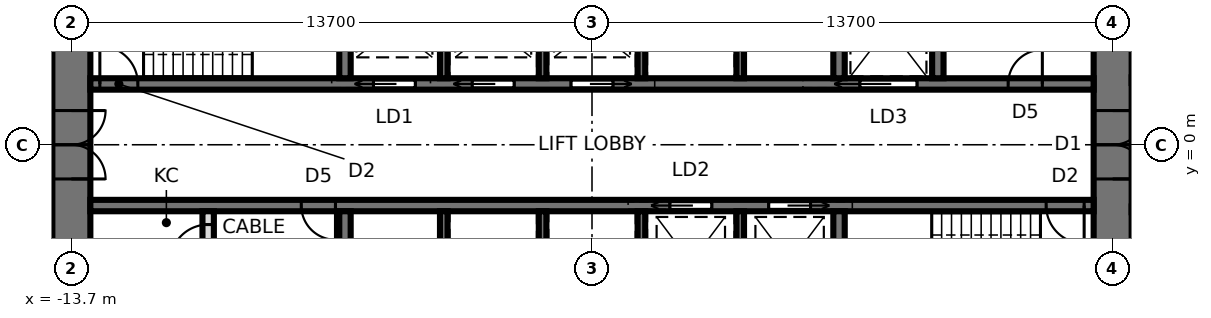
"""IFC4 building model, lengths in metres.
Left out: names, types, materials, properties, quantities, classifications, styles, units other than length and angle.
Written with IfcOpenShell. Run it as: python <this file> out.ifc"""

import sys

from ifc_helpers import new_model, si_unit, direction, frame, frame_2d, origin, place, context, subcontext, project, spatial, rectangle, extrude, element, fill, save


model = new_model("IFC4")
c1 = context("Model", 3, precision=1e-05, world=origin(), true_north=direction((0.0, 1.0)))
c2 = subcontext(c1, "Body", "Model", "MODEL_VIEW")
j1 = project(units=[si_unit("LENGTHUNIT", "METRE"), si_unit("PLANEANGLEUNIT", "RADIAN")], contexts=[c1])
p1 = place(None, origin())
s1 = spatial("IfcSite", under=j1, at=p1, CompositionType="ELEMENT")
p2 = place(p1, origin())
s2 = spatial("IfcBuilding", under=s1, at=p2, CompositionType="ELEMENT")
p3 = place(p2, frame((0.0, 0.0, 23.8)))
s3 = spatial("IfcBuildingStorey", under=s2, at=p3, CompositionType="ELEMENT", Elevation=23.8)
p4 = place(p3, frame((13.7, -9.5, 0.0), z_axis=(0.0, 0.0, 1.0), x_axis=(0.0, 1.0, 0.0)))
e1 = element("IfcWall", 1, at=p4, inside=s3, PredefinedType="SHEAR", context=c2, shape_type="SweptSolid", body=[
    extrude(rectangle(XDim=19.0, YDim=1.0, at=frame_2d((9.5, 0.0))), origin(), (0.0, 0.0, 1.0), 4.2),
])
p5 = place(p4, frame((8.6, 0.0, 0.0)))
e2 = element("IfcOpeningElement", 2, at=p5, cuts=e1, PredefinedType="OPENING", context=c2, shape_type="SweptSolid", body=[
    extrude(rectangle(XDim=1.8, YDim=2.4, at=frame_2d((0.9, 1.2))), frame((0.0, 0.51, 0.0), z_axis=(0.0, -1.0, 0.0), x_axis=(1.0, 0.0, 0.0)), (0.0, 0.0, 1.0), 1.02),
])
p6 = place(p3, frame((-13.7, 9.5, 0.0), z_axis=(0.0, 0.0, 1.0), x_axis=(0.0, -1.0, 0.0)))
e3 = element("IfcWall", 3, at=p6, inside=s3, PredefinedType="SHEAR", context=c2, shape_type="SweptSolid", body=[
    extrude(rectangle(XDim=19.0, YDim=1.0, at=frame_2d((9.5, 0.0))), origin(), (0.0, 0.0, 1.0), 4.2),
])
p7 = place(p6, frame((8.6, 0.0, 0.0)))
e4 = element("IfcOpeningElement", 4, at=p7, cuts=e3, PredefinedType="OPENING", context=c2, shape_type="SweptSolid", body=[
    extrude(rectangle(XDim=1.8, YDim=2.4, at=frame_2d((0.9, 1.2))), frame((0.0, 0.51, 0.0), z_axis=(0.0, -1.0, 0.0), x_axis=(1.0, 0.0, 0.0)), (0.0, 0.0, 1.0), 1.02),
])
p8 = place(p3, frame((-13.2, 1.6, 0.0), z_axis=(0.0, 0.0, 1.0), x_axis=(1.0, 0.0, 0.0)))
e5 = element("IfcWall", 5, at=p8, inside=s3, PredefinedType="SHEAR", context=c2, shape_type="SweptSolid", body=[
    extrude(rectangle(XDim=26.4, YDim=0.3, at=frame_2d((13.2, 0.0))), origin(), (0.0, 0.0, 1.0), 4.2),
])
p9 = place(p8, frame((0.25, 0.0, 0.0)))
e6 = element("IfcOpeningElement", 6, at=p9, cuts=e5, PredefinedType="OPENING", context=c2, shape_type="SweptSolid", body=[
    extrude(rectangle(XDim=1.0, YDim=2.1, at=frame_2d((0.5, 1.05))), frame((0.0, 0.16, 0.0), z_axis=(0.0, -1.0, 0.0), x_axis=(1.0, 0.0, 0.0)), (0.0, 0.0, 1.0), 0.32),
])
p10 = place(p8, frame((20.25, 0.0, 0.0)))
e7 = element("IfcOpeningElement", 7, at=p10, cuts=e5, PredefinedType="OPENING", context=c2, shape_type="SweptSolid", body=[
    extrude(rectangle(XDim=1.5, YDim=2.4, at=frame_2d((0.75, 1.2))), frame((0.0, 0.16, 0.0), z_axis=(0.0, -1.0, 0.0), x_axis=(1.0, 0.0, 0.0)), (0.0, 0.0, 1.0), 0.32),
])
p11 = place(p8, frame((7.45, 0.0, 0.0)))
e8 = element("IfcOpeningElement", 8, at=p11, cuts=e5, PredefinedType="OPENING", context=c2, shape_type="SweptSolid", body=[
    extrude(rectangle(XDim=1.1, YDim=2.3, at=frame_2d((0.55, 1.15))), frame((0.0, 0.16, 0.0), z_axis=(0.0, -1.0, 0.0), x_axis=(1.0, 0.0, 0.0)), (0.0, 0.0, 1.0), 0.32),
])
p12 = place(p8, frame((10.05, 0.0, 0.0)))
e9 = element("IfcOpeningElement", 9, at=p12, cuts=e5, PredefinedType="OPENING", context=c2, shape_type="SweptSolid", body=[
    extrude(rectangle(XDim=1.1, YDim=2.3, at=frame_2d((0.55, 1.15))), frame((0.0, 0.16, 0.0), z_axis=(0.0, -1.0, 0.0), x_axis=(1.0, 0.0, 0.0)), (0.0, 0.0, 1.0), 0.32),
])
p13 = place(p8, frame((12.65, 0.0, 0.0)))
e10 = element("IfcOpeningElement", 10, at=p13, cuts=e5, PredefinedType="OPENING", context=c2, shape_type="SweptSolid", body=[
    extrude(rectangle(XDim=1.1, YDim=2.3, at=frame_2d((0.55, 1.15))), frame((0.0, 0.16, 0.0), z_axis=(0.0, -1.0, 0.0), x_axis=(1.0, 0.0, 0.0)), (0.0, 0.0, 1.0), 0.32),
])
p14 = place(p8, frame((24.15, 0.0, 0.0)))
e11 = element("IfcOpeningElement", 11, at=p14, cuts=e5, PredefinedType="OPENING", context=c2, shape_type="SweptSolid", body=[
    extrude(rectangle(XDim=0.9, YDim=2.1, at=frame_2d((0.45, 1.05))), frame((0.0, 0.16, 0.0), z_axis=(0.0, -1.0, 0.0), x_axis=(1.0, 0.0, 0.0)), (0.0, 0.0, 1.0), 0.32),
])
p15 = place(p3, frame((-13.2, -1.6, 0.0), z_axis=(0.0, 0.0, 1.0), x_axis=(1.0, 0.0, 0.0)))
e12 = element("IfcWall", 12, at=p15, inside=s3, PredefinedType="SHEAR", context=c2, shape_type="SweptSolid", body=[
    extrude(rectangle(XDim=26.4, YDim=0.3, at=frame_2d((13.2, 0.0))), origin(), (0.0, 0.0, 1.0), 4.2),
])
p16 = place(p15, frame((25.15, 0.0, 0.0)))
e13 = element("IfcOpeningElement", 13, at=p16, cuts=e12, PredefinedType="OPENING", context=c2, shape_type="SweptSolid", body=[
    extrude(rectangle(XDim=1.0, YDim=2.1, at=frame_2d((0.5, 1.05))), frame((0.0, 0.16, 0.0), z_axis=(0.0, -1.0, 0.0), x_axis=(1.0, 0.0, 0.0)), (0.0, 0.0, 1.0), 0.32),
])
p17 = place(p15, frame((15.25, 0.0, 0.0)))
e14 = element("IfcOpeningElement", 14, at=p17, cuts=e12, PredefinedType="OPENING", context=c2, shape_type="SweptSolid", body=[
    extrude(rectangle(XDim=1.1, YDim=2.3, at=frame_2d((0.55, 1.15))), frame((0.0, 0.16, 0.0), z_axis=(0.0, -1.0, 0.0), x_axis=(1.0, 0.0, 0.0)), (0.0, 0.0, 1.0), 0.32),
])
p18 = place(p15, frame((17.85, 0.0, 0.0)))
e15 = element("IfcOpeningElement", 15, at=p18, cuts=e12, PredefinedType="OPENING", context=c2, shape_type="SweptSolid", body=[
    extrude(rectangle(XDim=1.1, YDim=2.3, at=frame_2d((0.55, 1.15))), frame((0.0, 0.16, 0.0), z_axis=(0.0, -1.0, 0.0), x_axis=(1.0, 0.0, 0.0)), (0.0, 0.0, 1.0), 0.32),
])
p19 = place(p15, frame((5.55, 0.0, 0.0)))
e16 = element("IfcOpeningElement", 16, at=p19, cuts=e12, PredefinedType="OPENING", context=c2, shape_type="SweptSolid", body=[
    extrude(rectangle(XDim=0.9, YDim=2.1, at=frame_2d((0.45, 1.05))), frame((0.0, 0.16, 0.0), z_axis=(0.0, -1.0, 0.0), x_axis=(1.0, 0.0, 0.0)), (0.0, 0.0, 1.0), 0.32),
])
for number, where, z_axis, x_axis in (
    (17, (-6.5, 1.75, 0.0), (0.0, 0.0, 1.0), (0.0, 1.0, 0.0)),
    (18, (6.5, 1.75, 0.0), (0.0, 0.0, 1.0), (0.0, 1.0, 0.0)),
):
    element("IfcWall", number, at=place(p3, frame(where, z_axis=z_axis, x_axis=x_axis)), inside=s3, PredefinedType="SHEAR", context=c2, shape_type="SweptSolid", body=[
        extrude(rectangle(XDim=2.7, YDim=0.3, at=frame_2d((1.35, 0.0))), origin(), (0.0, 0.0, 1.0), 4.2),
    ])
for number, where, z_axis, x_axis in (
    (19, (-3.9, 1.75, 0.0), (0.0, 0.0, 1.0), (0.0, 1.0, 0.0)),
    (20, (-1.3, 1.75, 0.0), (0.0, 0.0, 1.0), (0.0, 1.0, 0.0)),
    (21, (1.3, 1.75, 0.0), (0.0, 0.0, 1.0), (0.0, 1.0, 0.0)),
    (22, (3.9, 1.75, 0.0), (0.0, 0.0, 1.0), (0.0, 1.0, 0.0)),
):
    element("IfcWall", number, at=place(p3, frame(where, z_axis=z_axis, x_axis=x_axis)), inside=s3, PredefinedType="SHEAR", context=c2, shape_type="SweptSolid", body=[
        extrude(rectangle(XDim=2.7, YDim=0.2, at=frame_2d((1.35, 0.0))), origin(), (0.0, 0.0, 1.0), 4.2),
    ])
for number, where, z_axis, x_axis in (
    (23, (-6.5, -1.75, 0.0), (0.0, 0.0, 1.0), (0.0, -1.0, 0.0)),
    (24, (6.5, -1.75, 0.0), (0.0, 0.0, 1.0), (0.0, -1.0, 0.0)),
):
    element("IfcWall", number, at=place(p3, frame(where, z_axis=z_axis, x_axis=x_axis)), inside=s3, PredefinedType="SHEAR", context=c2, shape_type="SweptSolid", body=[
        extrude(rectangle(XDim=2.7, YDim=0.3, at=frame_2d((1.35, 0.0))), origin(), (0.0, 0.0, 1.0), 4.2),
    ])
for number, where, z_axis, x_axis in (
    (25, (-3.9, -1.75, 0.0), (0.0, 0.0, 1.0), (0.0, -1.0, 0.0)),
    (26, (-1.3, -1.75, 0.0), (0.0, 0.0, 1.0), (0.0, -1.0, 0.0)),
    (27, (1.3, -1.75, 0.0), (0.0, 0.0, 1.0), (0.0, -1.0, 0.0)),
    (28, (3.9, -1.75, 0.0), (0.0, 0.0, 1.0), (0.0, -1.0, 0.0)),
):
    element("IfcWall", number, at=place(p3, frame(where, z_axis=z_axis, x_axis=x_axis)), inside=s3, PredefinedType="SHEAR", context=c2, shape_type="SweptSolid", body=[
        extrude(rectangle(XDim=2.7, YDim=0.2, at=frame_2d((1.35, 0.0))), origin(), (0.0, 0.0, 1.0), 4.2),
    ])
p20 = place(p3, frame((9.1, 1.75, 0.0), z_axis=(0.0, 0.0, 1.0), x_axis=(0.0, 1.0, 0.0)))
e29 = element("IfcWall", 29, at=p20, inside=s3, PredefinedType="SHEAR", context=c2, shape_type="SweptSolid", body=[
    extrude(rectangle(XDim=2.7, YDim=0.3, at=frame_2d((1.35, 0.0))), origin(), (0.0, 0.0, 1.0), 4.2),
])
p21 = place(p3, frame((-10.1, -3.25, 0.0), z_axis=(0.0, 0.0, 1.0), x_axis=(0.0, 1.0, 0.0)))
e30 = element("IfcWall", 30, at=p21, inside=s3, PredefinedType="PARTITIONING", context=c2, shape_type="SweptSolid", body=[
    extrude(rectangle(XDim=1.5, YDim=0.3, at=frame_2d((0.75, 0.0))), origin(), (0.0, 0.0, 1.0), 4.04),
])
p22 = place(p21, frame((0.15, 0.0, 0.0)))
e31 = element("IfcOpeningElement", 31, at=p22, cuts=e30, PredefinedType="OPENING", context=c2, shape_type="SweptSolid", body=[
    extrude(rectangle(XDim=1.0, YDim=2.4, at=frame_2d((0.5, 1.2))), frame((0.0, 0.16, 0.0), z_axis=(0.0, -1.0, 0.0), x_axis=(1.0, 0.0, 0.0)), (0.0, 0.0, 1.0), 0.32),
])
p23 = place(p3, frame((18.4, 1.7, 0.0), z_axis=(0.0, 0.0, 1.0), x_axis=(-1.0, 0.0, 0.0)))
e32 = element("IfcWall", 32, at=p23, inside=s3, PredefinedType="PARTITIONING", context=c2, shape_type="SweptSolid", body=[
    extrude(rectangle(XDim=4.2, YDim=0.15, at=frame_2d((2.1, 0.0))), origin(), (0.0, 0.0, 1.0), 4.04),
])
p24 = place(p7, origin())
e33 = element("IfcDoor", 33, at=p24, inside=s3, OperationType="DOUBLE_DOOR_SINGLE_SWING", PredefinedType="DOOR", context=c2, shape_type="SweptSolid", body=[
    extrude(rectangle(XDim=1.72, YDim=2.36, at=frame_2d((0.9, 1.18))), frame((0.0, 0.025, 0.0), z_axis=(0.0, -1.0, 0.0), x_axis=(1.0, 0.0, 0.0)), (0.0, 0.0, 1.0), 0.05),
    extrude(rectangle(XDim=0.04, YDim=2.4, at=frame_2d((0.02, 1.2))), frame((0.0, 0.25, 0.0), z_axis=(0.0, -1.0, 0.0), x_axis=(1.0, 0.0, 0.0)), (0.0, 0.0, 1.0), 0.5),
    extrude(rectangle(XDim=0.04, YDim=2.4, at=frame_2d((1.78, 1.2))), frame((0.0, 0.25, 0.0), z_axis=(0.0, -1.0, 0.0), x_axis=(1.0, 0.0, 0.0)), (0.0, 0.0, 1.0), 0.5),
    extrude(rectangle(XDim=1.72, YDim=0.04, at=frame_2d((0.9, 2.38))), frame((0.0, 0.25, 0.0), z_axis=(0.0, -1.0, 0.0), x_axis=(1.0, 0.0, 0.0)), (0.0, 0.0, 1.0), 0.5),
])
fill(e4, e33)
p25 = place(p5, frame((1.8, 0.0, 0.0), z_axis=(0.0, 0.0, 1.0), x_axis=(-1.0, 0.0, 0.0)))
e34 = element("IfcDoor", 34, at=p25, inside=s3, OperationType="DOUBLE_DOOR_SINGLE_SWING", PredefinedType="DOOR", context=c2, shape_type="SweptSolid", body=[
    extrude(rectangle(XDim=1.72, YDim=2.36, at=frame_2d((0.9, 1.18))), frame((0.0, 0.025, 0.0), z_axis=(0.0, -1.0, 0.0), x_axis=(1.0, 0.0, 0.0)), (0.0, 0.0, 1.0), 0.05),
    extrude(rectangle(XDim=0.04, YDim=2.4, at=frame_2d((1.78, 1.2))), frame((0.0, 0.25, 0.0), z_axis=(0.0, -1.0, 0.0), x_axis=(1.0, 0.0, 0.0)), (0.0, 0.0, 1.0), 0.5),
    extrude(rectangle(XDim=0.04, YDim=2.4, at=frame_2d((0.02, 1.2))), frame((0.0, 0.25, 0.0), z_axis=(0.0, -1.0, 0.0), x_axis=(1.0, 0.0, 0.0)), (0.0, 0.0, 1.0), 0.5),
    extrude(rectangle(XDim=1.72, YDim=0.04, at=frame_2d((0.9, 2.38))), frame((0.0, 0.25, 0.0), z_axis=(0.0, -1.0, 0.0), x_axis=(1.0, 0.0, 0.0)), (0.0, 0.0, 1.0), 0.5),
])
fill(e2, e34)
p26 = place(p9, origin())
e35 = element("IfcDoor", 35, at=p26, inside=s3, OperationType="SINGLE_SWING_LEFT", PredefinedType="DOOR", context=c2, shape_type="SweptSolid", body=[
    extrude(rectangle(XDim=1.0, YDim=2.1, at=frame_2d((0.5, 1.05))), frame((0.0, 0.025, 0.0), z_axis=(0.0, -1.0, 0.0), x_axis=(1.0, 0.0, 0.0)), (0.0, 0.0, 1.0), 0.05),
])
fill(e6, e35)
p27 = place(p16, frame((1.0, 0.0, 0.0), z_axis=(0.0, 0.0, 1.0), x_axis=(-1.0, 0.0, 0.0)))
e36 = element("IfcDoor", 36, at=p27, inside=s3, OperationType="SINGLE_SWING_LEFT", PredefinedType="DOOR", context=c2, shape_type="SweptSolid", body=[
    extrude(rectangle(XDim=1.0, YDim=2.1, at=frame_2d((0.5, 1.05))), frame((0.0, 0.025, 0.0), z_axis=(0.0, -1.0, 0.0), x_axis=(1.0, 0.0, 0.0)), (0.0, 0.0, 1.0), 0.05),
])
fill(e13, e36)
p28 = place(p10, origin())
e37 = element("IfcDoor", 37, at=p28, inside=s3, OperationType="SLIDING_TO_LEFT", PredefinedType="DOOR", context=c2, shape_type="SweptSolid", body=[
    extrude(rectangle(XDim=1.5, YDim=2.4, at=frame_2d((0.75, 1.2))), frame((0.0, 0.025, 0.0), z_axis=(0.0, -1.0, 0.0), x_axis=(1.0, 0.0, 0.0)), (0.0, 0.0, 1.0), 0.05),
])
fill(e7, e37)
p29 = place(p11, origin())
e38 = element("IfcDoor", 38, at=p29, inside=s3, OperationType="SLIDING_TO_LEFT", PredefinedType="DOOR", context=c2, shape_type="SweptSolid", body=[
    extrude(rectangle(XDim=1.1, YDim=2.3, at=frame_2d((0.55, 1.15))), frame((0.0, 0.025, 0.0), z_axis=(0.0, -1.0, 0.0), x_axis=(1.0, 0.0, 0.0)), (0.0, 0.0, 1.0), 0.05),
])
fill(e8, e38)
p30 = place(p12, origin())
e39 = element("IfcDoor", 39, at=p30, inside=s3, OperationType="SLIDING_TO_LEFT", PredefinedType="DOOR", context=c2, shape_type="SweptSolid", body=[
    extrude(rectangle(XDim=1.1, YDim=2.3, at=frame_2d((0.55, 1.15))), frame((0.0, 0.025, 0.0), z_axis=(0.0, -1.0, 0.0), x_axis=(1.0, 0.0, 0.0)), (0.0, 0.0, 1.0), 0.05),
])
fill(e9, e39)
p31 = place(p13, origin())
e40 = element("IfcDoor", 40, at=p31, inside=s3, OperationType="SLIDING_TO_RIGHT", PredefinedType="DOOR", context=c2, shape_type="SweptSolid", body=[
    extrude(rectangle(XDim=1.1, YDim=2.3, at=frame_2d((0.55, 1.15))), frame((0.0, 0.025, 0.0), z_axis=(0.0, -1.0, 0.0), x_axis=(1.0, 0.0, 0.0)), (0.0, 0.0, 1.0), 0.05),
])
fill(e10, e40)
p32 = place(p17, frame((1.1, 0.0, 0.0), z_axis=(0.0, 0.0, 1.0), x_axis=(-1.0, 0.0, 0.0)))
e41 = element("IfcDoor", 41, at=p32, inside=s3, OperationType="SLIDING_TO_RIGHT", PredefinedType="DOOR", context=c2, shape_type="SweptSolid", body=[
    extrude(rectangle(XDim=1.1, YDim=2.3, at=frame_2d((0.55, 1.15))), frame((0.0, 0.025, 0.0), z_axis=(0.0, -1.0, 0.0), x_axis=(1.0, 0.0, 0.0)), (0.0, 0.0, 1.0), 0.05),
])
fill(e14, e41)
p33 = place(p18, frame((1.1, 0.0, 0.0), z_axis=(0.0, 0.0, 1.0), x_axis=(-1.0, 0.0, 0.0)))
e42 = element("IfcDoor", 42, at=p33, inside=s3, OperationType="SLIDING_TO_LEFT", PredefinedType="DOOR", context=c2, shape_type="SweptSolid", body=[
    extrude(rectangle(XDim=1.1, YDim=2.3, at=frame_2d((0.55, 1.15))), frame((0.0, 0.025, 0.0), z_axis=(0.0, -1.0, 0.0), x_axis=(1.0, 0.0, 0.0)), (0.0, 0.0, 1.0), 0.05),
])
fill(e15, e42)
p34 = place(p14, origin())
e43 = element("IfcDoor", 43, at=p34, inside=s3, OperationType="SINGLE_SWING_RIGHT", PredefinedType="DOOR", context=c2, shape_type="SweptSolid", body=[
    extrude(rectangle(XDim=0.9, YDim=2.1, at=frame_2d((0.45, 1.05))), frame((0.0, 0.025, 0.0), z_axis=(0.0, -1.0, 0.0), x_axis=(1.0, 0.0, 0.0)), (0.0, 0.0, 1.0), 0.05),
])
fill(e11, e43)
p35 = place(p19, frame((0.9, 0.0, 0.0), z_axis=(0.0, 0.0, 1.0), x_axis=(-1.0, 0.0, 0.0)))
e44 = element("IfcDoor", 44, at=p35, inside=s3, OperationType="SINGLE_SWING_LEFT", PredefinedType="DOOR", context=c2, shape_type="SweptSolid", body=[
    extrude(rectangle(XDim=0.9, YDim=2.1, at=frame_2d((0.45, 1.05))), frame((0.0, 0.025, 0.0), z_axis=(0.0, -1.0, 0.0), x_axis=(1.0, 0.0, 0.0)), (0.0, 0.0, 1.0), 0.05),
])
fill(e16, e44)
p36 = place(p22, origin())
e45 = element("IfcDoor", 45, at=p36, inside=s3, OperationType="SINGLE_SWING_LEFT", PredefinedType="DOOR", context=c2, shape_type="SweptSolid", body=[
    extrude(rectangle(XDim=1.0, YDim=2.4, at=frame_2d((0.5, 1.2))), frame((0.0, 0.025, 0.0), z_axis=(0.0, -1.0, 0.0), x_axis=(1.0, 0.0, 0.0)), (0.0, 0.0, 1.0), 0.05),
])
fill(e31, e45)
save(model, sys.argv[1])
